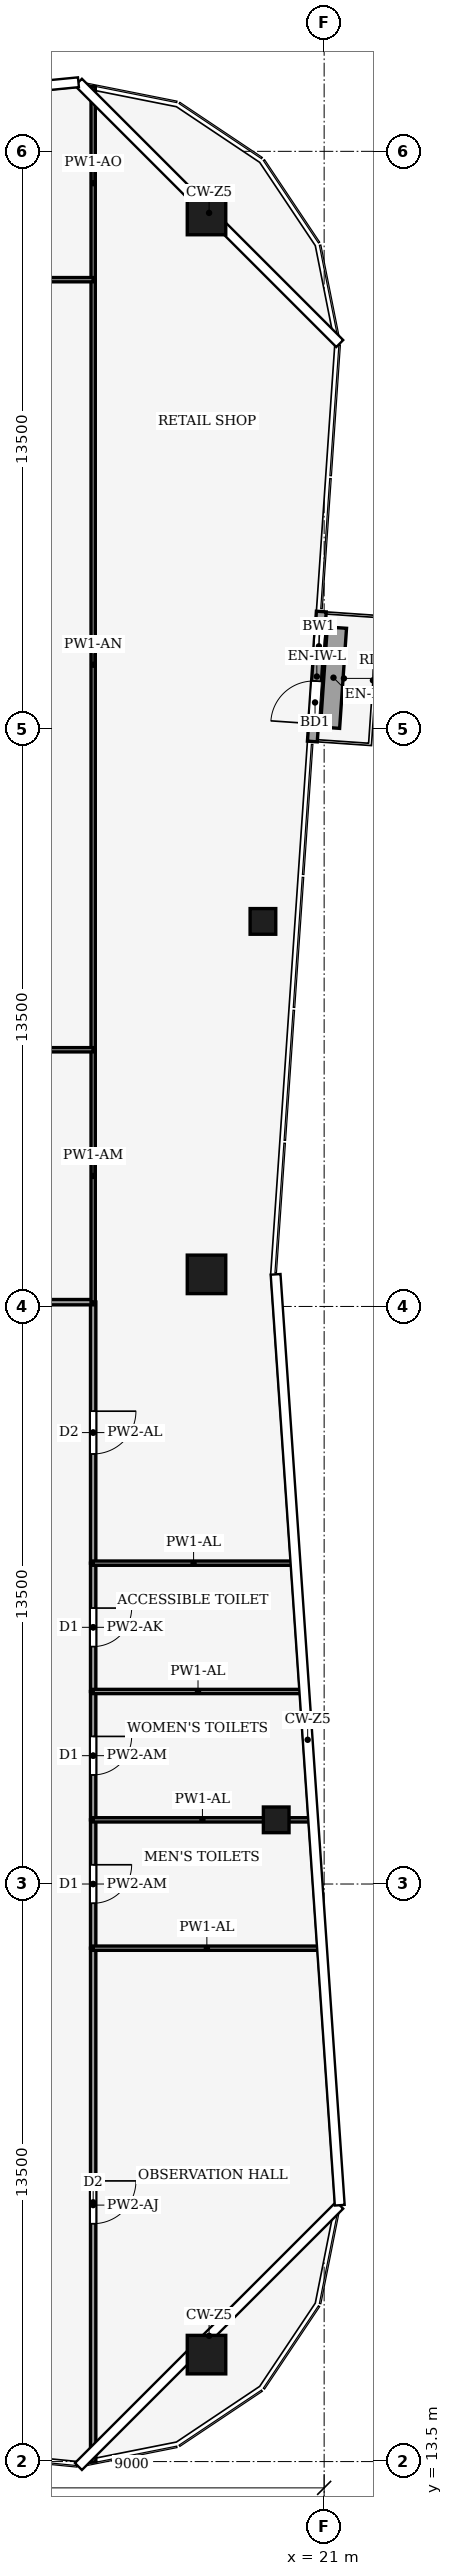
"""IFC4 building model, lengths in metres.
Left out: names, types, materials, properties, quantities, classifications, styles, units other than length and angle.
Written with IfcOpenShell. Run it as: python <this file> out.ifc"""

import sys

from ifc_helpers import new_model, si_unit, direction, frame, frame_2d, origin, origin_2d, place, context, subcontext, project, spatial, rectangle, hollow_rectangle, extrude, element, fill, save


model = new_model("IFC4")
c1 = context("Model", 3, precision=1e-05, world=origin(), true_north=direction((0.0, 1.0)))
c2 = subcontext(c1, "Body", "Model", "MODEL_VIEW")
j1 = project(units=[si_unit("LENGTHUNIT", "METRE"), si_unit("PLANEANGLEUNIT", "RADIAN")], contexts=[c1])
p1 = place(None, origin())
s1 = spatial("IfcSite", under=j1, at=p1, CompositionType="ELEMENT")
p2 = place(p1, origin())
s2 = spatial("IfcBuilding", under=s1, at=p2, CompositionType="ELEMENT")
p3 = place(p2, frame((0.0, 0.0, 334.0)))
s3 = spatial("IfcBuildingStorey", under=s2, at=p3, CompositionType="ELEMENT", Elevation=334.0)
for number, where, z_axis, x_axis in (
    (1, (18.25, 66.0, 0.0), (0.0, 0.0, 1.0), (1.0, 0.0, 0.0)),
    (2, (18.25, 41.25, 0.0), (0.0, 0.0, 1.0), (1.0, 0.0, 0.0)),
    (3, (18.25, 16.0, 0.0), (0.0, 0.0, 1.0), (1.0, 0.0, 0.0)),
):
    element("IfcColumn", number, at=place(p3, frame(where, z_axis=z_axis, x_axis=x_axis)), inside=s3, PredefinedType="COLUMN", context=c2, shape_type="SweptSolid", body=[
        extrude(hollow_rectangle(XDim=0.9, YDim=0.9, WallThickness=0.04, at=origin_2d()), origin(), (0.0, 0.0, 1.0), 6.5),
    ])
for number, where, z_axis, x_axis in (
    (4, (19.879, 28.5, 0.0), (0.0, 0.0, 1.0), (1.0, 0.0, 0.0)),
    (5, (19.569, 49.5, 0.0), (0.0, 0.0, 1.0), (1.0, 0.0, 0.0)),
):
    element("IfcColumn", number, at=place(p3, frame(where, z_axis=z_axis, x_axis=x_axis)), inside=s3, PredefinedType="COLUMN", context=c2, shape_type="SweptSolid", body=[
        extrude(hollow_rectangle(XDim=0.6, YDim=0.6, WallThickness=0.025, at=origin_2d()), origin(), (0.0, 0.0, 1.0), 6.5),
    ])
p4 = place(p3, frame((20.724, 53.706, 0.0), z_axis=(0.0, 0.0, 1.0), x_axis=(0.068802091615, 0.997630328423, 0.0)))
e6 = element("IfcWall", 6, at=p4, inside=s3, PredefinedType="SOLIDWALL", context=c2, shape_type="SweptSolid", body=[
    extrude(rectangle(XDim=3.045, YDim=0.23, at=frame_2d((1.522, 0.0))), origin(), (0.0, 0.0, 1.0), 6.15),
])
p5 = place(p4, frame((0.415, 0.0, 0.0)))
e7 = element("IfcOpeningElement", 7, at=p5, cuts=e6, PredefinedType="OPENING", context=c2, shape_type="SweptSolid", body=[
    extrude(rectangle(XDim=1.0, YDim=2.1, at=frame_2d((0.5, 1.05))), frame((0.0, 0.125, 0.0), z_axis=(0.0, -1.0, 0.0), x_axis=(1.0, 0.0, 0.0)), (0.0, 0.0, 1.0), 0.25),
])
p6 = place(p4, frame((1.83, 0.0, 0.9)))
e8 = element("IfcOpeningElement", 8, at=p6, cuts=e6, PredefinedType="OPENING", context=c2, shape_type="SweptSolid", body=[
    extrude(rectangle(XDim=0.8, YDim=1.2, at=frame_2d((0.4, 0.6))), frame((0.0, 0.125, 0.0), z_axis=(0.0, -1.0, 0.0), x_axis=(1.0, 0.0, 0.0)), (0.0, 0.0, 1.0), 0.25),
])
p7 = place(p3, frame((21.137, 54.028, 0.0), z_axis=(0.0, 0.0, 1.0), x_axis=(0.068827106414, 0.997628602949, 0.0)))
e9 = element("IfcWall", 9, at=p7, inside=s3, PredefinedType="USERDEFINED", context=c2, shape_type="SweptSolid", body=[
    extrude(rectangle(XDim=2.345, YDim=0.45, at=frame_2d((1.172, 0.0))), origin(), (0.0, 0.0, 1.0), 0.4),
])
p8 = place(p3, frame((15.6, 25.5, 0.0), z_axis=(0.0, 0.0, 1.0), x_axis=(0.0, -1.0, 0.0)))
e10 = element("IfcWall", 10, at=p8, inside=s3, PredefinedType="PARTITIONING", context=c2, shape_type="SweptSolid", body=[
    extrude(rectangle(XDim=12.01, YDim=0.125, at=frame_2d((6.005, 0.0))), origin(), (0.0, 0.0, 1.0), 5.41),
])
p9 = place(p8, frame((5.44, 0.0, 0.0)))
e11 = element("IfcOpeningElement", 11, at=p9, cuts=e10, PredefinedType="OPENING", context=c2, shape_type="SweptSolid", body=[
    extrude(rectangle(XDim=1.0, YDim=2.1, at=frame_2d((0.5, 1.05))), frame((0.0, 0.073, 0.0), z_axis=(0.0, -1.0, 0.0), x_axis=(1.0, 0.0, 0.0)), (0.0, 0.0, 1.0), 0.145),
])
p10 = place(p3, frame((15.6, 28.5, 0.0), z_axis=(0.0, 0.0, 1.0), x_axis=(0.0, -1.0, 0.0)))
e12 = element("IfcWall", 12, at=p10, inside=s3, PredefinedType="PARTITIONING", context=c2, shape_type="SweptSolid", body=[
    extrude(rectangle(XDim=3.0, YDim=0.125, at=frame_2d((1.5, 0.0))), origin(), (0.0, 0.0, 1.0), 6.35),
])
p11 = place(p10, frame((1.05, 0.0, 0.0)))
e13 = element("IfcOpeningElement", 13, at=p11, cuts=e12, PredefinedType="OPENING", context=c2, shape_type="SweptSolid", body=[
    extrude(rectangle(XDim=0.9, YDim=2.1, at=frame_2d((0.45, 1.05))), frame((0.0, 0.073, 0.0), z_axis=(0.0, -1.0, 0.0), x_axis=(1.0, 0.0, 0.0)), (0.0, 0.0, 1.0), 0.145),
])
p12 = place(p3, frame((15.6, 31.5, 0.0), z_axis=(0.0, 0.0, 1.0), x_axis=(0.0, -1.0, 0.0)))
e14 = element("IfcWall", 14, at=p12, inside=s3, PredefinedType="PARTITIONING", context=c2, shape_type="SweptSolid", body=[
    extrude(rectangle(XDim=3.0, YDim=0.125, at=frame_2d((1.5, 0.0))), origin(), (0.0, 0.0, 1.0), 6.35),
])
p13 = place(p12, frame((1.05, 0.0, 0.0)))
e15 = element("IfcOpeningElement", 15, at=p13, cuts=e14, PredefinedType="OPENING", context=c2, shape_type="SweptSolid", body=[
    extrude(rectangle(XDim=0.9, YDim=2.1, at=frame_2d((0.45, 1.05))), frame((0.0, 0.073, 0.0), z_axis=(0.0, -1.0, 0.0), x_axis=(1.0, 0.0, 0.0)), (0.0, 0.0, 1.0), 0.145),
])
p14 = place(p3, frame((15.6, 34.5, 0.0), z_axis=(0.0, 0.0, 1.0), x_axis=(0.0, -1.0, 0.0)))
e16 = element("IfcWall", 16, at=p14, inside=s3, PredefinedType="PARTITIONING", context=c2, shape_type="SweptSolid", body=[
    extrude(rectangle(XDim=3.0, YDim=0.125, at=frame_2d((1.5, 0.0))), origin(), (0.0, 0.0, 1.0), 6.02),
])
p15 = place(p14, frame((1.05, 0.0, 0.0)))
e17 = element("IfcOpeningElement", 17, at=p15, cuts=e16, PredefinedType="OPENING", context=c2, shape_type="SweptSolid", body=[
    extrude(rectangle(XDim=0.9, YDim=2.1, at=frame_2d((0.45, 1.05))), frame((0.0, 0.073, 0.0), z_axis=(0.0, -1.0, 0.0), x_axis=(1.0, 0.0, 0.0)), (0.0, 0.0, 1.0), 0.145),
])
p16 = place(p3, frame((15.6, 40.604, 0.0), z_axis=(0.0, 0.0, 1.0), x_axis=(0.0, -1.0, 0.0)))
e18 = element("IfcWall", 18, at=p16, inside=s3, PredefinedType="PARTITIONING", context=c2, shape_type="SweptSolid", body=[
    extrude(rectangle(XDim=6.104, YDim=0.125, at=frame_2d((3.052, 0.0))), origin(), (0.0, 0.0, 1.0), 5.62),
])
p17 = place(p16, frame((2.552, 0.0, 0.0)))
e19 = element("IfcOpeningElement", 19, at=p17, cuts=e18, PredefinedType="OPENING", context=c2, shape_type="SweptSolid", body=[
    extrude(rectangle(XDim=1.0, YDim=2.1, at=frame_2d((0.5, 1.05))), frame((0.0, 0.073, 0.0), z_axis=(0.0, -1.0, 0.0), x_axis=(1.0, 0.0, 0.0)), (0.0, 0.0, 1.0), 0.145),
])
p18 = place(p3, frame((3.0, 40.6, 0.0), z_axis=(0.0, 0.0, 1.0), x_axis=(1.0, 0.0, 0.0)))
e20 = element("IfcWall", 20, at=p18, inside=s3, PredefinedType="PARTITIONING", context=c2, shape_type="SweptSolid", body=[
    extrude(rectangle(XDim=12.6, YDim=0.125, at=frame_2d((6.3, 0.0))), origin(), (0.0, 0.0, 1.0), 5.87),
])
p19 = place(p18, frame((5.8, 0.0, 0.0)))
e21 = element("IfcOpeningElement", 21, at=p19, cuts=e20, PredefinedType="OPENING", context=c2, shape_type="SweptSolid", body=[
    extrude(rectangle(XDim=1.0, YDim=2.1, at=frame_2d((0.5, 1.05))), frame((0.0, 0.073, 0.0), z_axis=(0.0, -1.0, 0.0), x_axis=(1.0, 0.0, 0.0)), (0.0, 0.0, 1.0), 0.145),
])
p20 = place(p3, frame((20.916, 25.5, 0.0), z_axis=(0.0, 0.0, 1.0), x_axis=(-1.0, 0.0, 0.0)))
e22 = element("IfcWall", 22, at=p20, inside=s3, PredefinedType="PARTITIONING", context=c2, shape_type="SweptSolid", body=[
    extrude(rectangle(XDim=5.316, YDim=0.1, at=frame_2d((2.658, 0.0))), origin(), (0.0, 0.0, 1.0), 5.52),
])
p21 = place(p3, frame((20.709, 28.5, 0.0), z_axis=(0.0, 0.0, 1.0), x_axis=(-1.0, 0.0, 0.0)))
e23 = element("IfcWall", 23, at=p21, inside=s3, PredefinedType="PARTITIONING", context=c2, shape_type="SweptSolid", body=[
    extrude(rectangle(XDim=5.109, YDim=0.1, at=frame_2d((2.555, 0.0))), origin(), (0.0, 0.0, 1.0), 5.52),
])
p22 = place(p3, frame((20.502, 31.5, 0.0), z_axis=(0.0, 0.0, 1.0), x_axis=(-1.0, 0.0, 0.0)))
e24 = element("IfcWall", 24, at=p22, inside=s3, PredefinedType="PARTITIONING", context=c2, shape_type="SweptSolid", body=[
    extrude(rectangle(XDim=4.902, YDim=0.1, at=frame_2d((2.451, 0.0))), origin(), (0.0, 0.0, 1.0), 5.52),
])
p23 = place(p3, frame((20.295, 34.5, 0.0), z_axis=(0.0, 0.0, 1.0), x_axis=(-1.0, 0.0, 0.0)))
e25 = element("IfcWall", 25, at=p23, inside=s3, PredefinedType="PARTITIONING", context=c2, shape_type="SweptSolid", body=[
    extrude(rectangle(XDim=4.695, YDim=0.1, at=frame_2d((2.348, 0.0))), origin(), (0.0, 0.0, 1.0), 5.52),
])
p24 = place(p3, frame((15.6, 46.5, 0.0), z_axis=(0.0, 0.0, 1.0), x_axis=(0.0, -1.0, 0.0)))
e26 = element("IfcWall", 26, at=p24, inside=s3, PredefinedType="PARTITIONING", context=c2, shape_type="SweptSolid", body=[
    extrude(rectangle(XDim=5.9, YDim=0.1, at=frame_2d((2.95, 0.0))), origin(), (0.0, 0.0, 1.0), 6.35),
])
p25 = place(p3, frame((15.6, 64.5, 0.0), z_axis=(0.0, 0.0, 1.0), x_axis=(0.0, -1.0, 0.0)))
e27 = element("IfcWall", 27, at=p25, inside=s3, PredefinedType="PARTITIONING", context=c2, shape_type="SweptSolid", body=[
    extrude(rectangle(XDim=18.0, YDim=0.1, at=frame_2d((9.0, 0.0))), origin(), (0.0, 0.0, 1.0), 5.83),
])
p26 = place(p3, frame((15.6, 69.01, 0.0), z_axis=(0.0, 0.0, 1.0), x_axis=(0.0, -1.0, 0.0)))
e28 = element("IfcWall", 28, at=p26, inside=s3, PredefinedType="PARTITIONING", context=c2, shape_type="SweptSolid", body=[
    extrude(rectangle(XDim=4.51, YDim=0.1, at=frame_2d((2.255, 0.0))), origin(), (0.0, 0.0, 1.0), 5.41),
])
p27 = place(p3, frame((3.0, 46.5, 0.0), z_axis=(0.0, 0.0, 1.0), x_axis=(1.0, 0.0, 0.0)))
e29 = element("IfcWall", 29, at=p27, inside=s3, PredefinedType="PARTITIONING", context=c2, shape_type="SweptSolid", body=[
    extrude(rectangle(XDim=12.6, YDim=0.1, at=frame_2d((6.3, 0.0))), origin(), (0.0, 0.0, 1.0), 5.87),
])
p28 = place(p27, frame((5.4, 0.0, 0.0)))
e30 = element("IfcOpeningElement", 30, at=p28, cuts=e29, PredefinedType="OPENING", context=c2, shape_type="SweptSolid", body=[
    extrude(rectangle(XDim=1.8, YDim=2.1, at=frame_2d((0.9, 1.05))), frame((0.0, 0.06, 0.0), z_axis=(0.0, -1.0, 0.0), x_axis=(1.0, 0.0, 0.0)), (0.0, 0.0, 1.0), 0.12),
])
p29 = place(p3, frame((3.0, 64.5, 0.0), z_axis=(0.0, 0.0, 1.0), x_axis=(1.0, 0.0, 0.0)))
e31 = element("IfcWall", 31, at=p29, inside=s3, PredefinedType="PARTITIONING", context=c2, shape_type="SweptSolid", body=[
    extrude(rectangle(XDim=12.6, YDim=0.1, at=frame_2d((6.3, 0.0))), origin(), (0.0, 0.0, 1.0), 5.72),
])
p30 = place(p29, frame((5.8, 0.0, 0.0)))
e32 = element("IfcOpeningElement", 32, at=p30, cuts=e31, PredefinedType="OPENING", context=c2, shape_type="SweptSolid", body=[
    extrude(rectangle(XDim=1.0, YDim=2.1, at=frame_2d((0.5, 1.05))), frame((0.0, 0.06, 0.0), z_axis=(0.0, -1.0, 0.0), x_axis=(1.0, 0.0, 0.0)), (0.0, 0.0, 1.0), 0.12),
])
p31 = place(p5, origin())
e33 = element("IfcDoor", 33, at=p31, inside=s3, OperationType="SINGLE_SWING_LEFT", PredefinedType="DOOR", context=c2, shape_type="SweptSolid", body=[
    extrude(rectangle(XDim=1.0, YDim=2.1, at=frame_2d((0.5, 1.05))), frame((0.0, 0.025, 0.0), z_axis=(0.0, -1.0, 0.0), x_axis=(1.0, 0.0, 0.0)), (0.0, 0.0, 1.0), 0.05),
])
fill(e7, e33)
p32 = place(p6, origin())
e34 = element("IfcWindow", 34, at=p32, inside=s3, PartitioningType="SINGLE_PANEL", PredefinedType="WINDOW", context=c2, shape_type="SweptSolid", body=[
    extrude(rectangle(XDim=0.8, YDim=1.2, at=frame_2d((0.4, 0.6))), frame((0.0, 0.03, 0.0), z_axis=(0.0, -1.0, 0.0), x_axis=(1.0, 0.0, 0.0)), (0.0, 0.0, 1.0), 0.06),
])
fill(e8, e34)
p33 = place(p9, origin())
e35 = element("IfcDoor", 35, at=p33, inside=s3, OperationType="SINGLE_SWING_LEFT", PredefinedType="DOOR", context=c2, shape_type="SweptSolid", body=[
    extrude(rectangle(XDim=1.0, YDim=2.1, at=frame_2d((0.5, 1.05))), frame((0.0, 0.025, 0.0), z_axis=(0.0, -1.0, 0.0), x_axis=(1.0, 0.0, 0.0)), (0.0, 0.0, 1.0), 0.05),
])
fill(e11, e35)
p34 = place(p11, origin())
e36 = element("IfcDoor", 36, at=p34, inside=s3, OperationType="SINGLE_SWING_LEFT", PredefinedType="DOOR", context=c2, shape_type="SweptSolid", body=[
    extrude(rectangle(XDim=0.9, YDim=2.1, at=frame_2d((0.45, 1.05))), frame((0.0, 0.025, 0.0), z_axis=(0.0, -1.0, 0.0), x_axis=(1.0, 0.0, 0.0)), (0.0, 0.0, 1.0), 0.05),
])
fill(e13, e36)
p35 = place(p13, origin())
e37 = element("IfcDoor", 37, at=p35, inside=s3, OperationType="SINGLE_SWING_RIGHT", PredefinedType="DOOR", context=c2, shape_type="SweptSolid", body=[
    extrude(rectangle(XDim=0.9, YDim=2.1, at=frame_2d((0.45, 1.05))), frame((0.0, 0.025, 0.0), z_axis=(0.0, -1.0, 0.0), x_axis=(1.0, 0.0, 0.0)), (0.0, 0.0, 1.0), 0.05),
])
fill(e15, e37)
p36 = place(p15, origin())
e38 = element("IfcDoor", 38, at=p36, inside=s3, OperationType="SINGLE_SWING_LEFT", PredefinedType="DOOR", context=c2, shape_type="SweptSolid", body=[
    extrude(rectangle(XDim=0.9, YDim=2.1, at=frame_2d((0.45, 1.05))), frame((0.0, 0.025, 0.0), z_axis=(0.0, -1.0, 0.0), x_axis=(1.0, 0.0, 0.0)), (0.0, 0.0, 1.0), 0.05),
])
fill(e17, e38)
p37 = place(p17, origin())
e39 = element("IfcDoor", 39, at=p37, inside=s3, OperationType="SINGLE_SWING_RIGHT", PredefinedType="DOOR", context=c2, shape_type="SweptSolid", body=[
    extrude(rectangle(XDim=1.0, YDim=2.1, at=frame_2d((0.5, 1.05))), frame((0.0, 0.025, 0.0), z_axis=(0.0, -1.0, 0.0), x_axis=(1.0, 0.0, 0.0)), (0.0, 0.0, 1.0), 0.05),
])
fill(e19, e39)
save(model, sys.argv[1])
